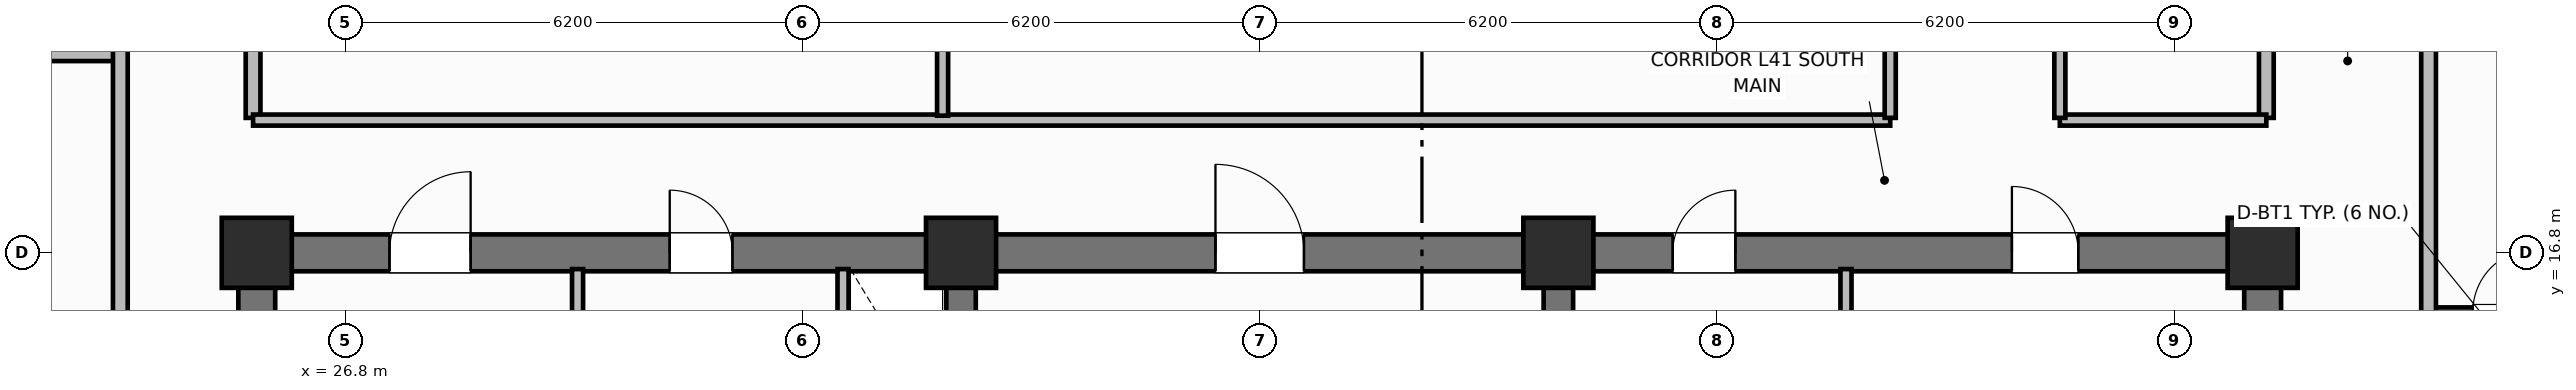
"""IFC4 building model, lengths in metres.
Left out: names, types, materials, properties, quantities, classifications, styles, units other than length and angle.
Written with IfcOpenShell. Run it as: python <this file> out.ifc"""

import sys

from ifc_helpers import new_model, si_unit, direction, frame, frame_2d, origin, origin_2d, place, context, subcontext, project, spatial, rectangle, extrude, element, fill, save


model = new_model("IFC4")
c1 = context("Model", 3, precision=1e-05, world=origin(), true_north=direction((0.0, 1.0)))
c2 = subcontext(c1, "Body", "Model", "MODEL_VIEW")
j1 = project(units=[si_unit("LENGTHUNIT", "METRE"), si_unit("PLANEANGLEUNIT", "RADIAN")], contexts=[c1])
p1 = place(None, origin())
s1 = spatial("IfcSite", under=j1, at=p1, CompositionType="ELEMENT")
p2 = place(p1, origin())
s2 = spatial("IfcBuilding", under=s1, at=p2, CompositionType="ELEMENT")
p3 = place(p2, frame((0.0, 0.0, 166.3)))
s3 = spatial("IfcBuildingStorey", under=s2, at=p3, CompositionType="ELEMENT", Elevation=166.3)
for number, where, z_axis, x_axis in (
    (1, (25.6, 10.85, 0.0), (0.0, 0.0, 1.0), (0.0, 1.0, 0.0)),
    (2, (52.8, 10.85, 0.0), (0.0, 0.0, 1.0), (0.0, 1.0, 0.0)),
):
    element("IfcWall", number, at=place(p3, frame(where, z_axis=z_axis, x_axis=x_axis)), inside=s3, PredefinedType="SHEAR", context=c2, shape_type="SweptSolid", body=[
        extrude(rectangle(XDim=5.7, YDim=0.5, at=frame_2d((2.85, 0.0))), origin(), (0.0, 0.0, 1.0), 3.7),
    ])
p4 = place(p3, frame((25.6, 16.8, 0.0), z_axis=(0.0, 0.0, 1.0), x_axis=(1.0, 0.0, 0.0)))
e3 = element("IfcWall", 3, at=p4, inside=s3, PredefinedType="SHEAR", context=c2, shape_type="SweptSolid", body=[
    extrude(rectangle(XDim=27.2, YDim=0.5, at=frame_2d((13.6, 0.0))), origin(), (0.0, 0.0, 1.0), 3.7),
])
p5 = place(p4, frame((1.8, 0.0, 0.0)))
e4 = element("IfcOpeningElement", 4, at=p5, cuts=e3, PredefinedType="OPENING", context=c2, shape_type="SweptSolid", body=[
    extrude(rectangle(XDim=1.1, YDim=2.15, at=frame_2d((0.55, 1.075))), frame((0.0, 0.26, 0.0), z_axis=(0.0, -1.0, 0.0), x_axis=(1.0, 0.0, 0.0)), (0.0, 0.0, 1.0), 0.52),
])
p6 = place(p4, frame((5.6, 0.0, 0.0)))
e5 = element("IfcOpeningElement", 5, at=p6, cuts=e3, PredefinedType="OPENING", context=c2, shape_type="SweptSolid", body=[
    extrude(rectangle(XDim=0.85, YDim=2.1, at=frame_2d((0.425, 1.05))), frame((0.0, 0.26, 0.0), z_axis=(0.0, -1.0, 0.0), x_axis=(1.0, 0.0, 0.0)), (0.0, 0.0, 1.0), 0.52),
])
p7 = place(p4, frame((13.0, 0.0, 0.0)))
e6 = element("IfcOpeningElement", 6, at=p7, cuts=e3, PredefinedType="OPENING", context=c2, shape_type="SweptSolid", body=[
    extrude(rectangle(XDim=1.2, YDim=2.15, at=frame_2d((0.6, 1.075))), frame((0.0, 0.26, 0.0), z_axis=(0.0, -1.0, 0.0), x_axis=(1.0, 0.0, 0.0)), (0.0, 0.0, 1.0), 0.52),
])
p8 = place(p4, frame((19.2, 0.0, 0.0)))
e7 = element("IfcOpeningElement", 7, at=p8, cuts=e3, PredefinedType="OPENING", context=c2, shape_type="SweptSolid", body=[
    extrude(rectangle(XDim=0.85, YDim=2.1, at=frame_2d((0.425, 1.05))), frame((0.0, 0.26, 0.0), z_axis=(0.0, -1.0, 0.0), x_axis=(1.0, 0.0, 0.0)), (0.0, 0.0, 1.0), 0.52),
])
p9 = place(p4, frame((23.8, 0.0, 0.0)))
e8 = element("IfcOpeningElement", 8, at=p9, cuts=e3, PredefinedType="OPENING", context=c2, shape_type="SweptSolid", body=[
    extrude(rectangle(XDim=0.9, YDim=2.1, at=frame_2d((0.45, 1.05))), frame((0.0, 0.26, 0.0), z_axis=(0.0, -1.0, 0.0), x_axis=(1.0, 0.0, 0.0)), (0.0, 0.0, 1.0), 0.52),
])
for number, where, z_axis, x_axis in (
    (9, (35.15, 10.85, 0.0), (0.0, 0.0, 1.0), (0.0, 1.0, 0.0)),
    (10, (43.25, 10.85, 0.0), (0.0, 0.0, 1.0), (0.0, 1.0, 0.0)),
):
    element("IfcWall", number, at=place(p3, frame(where, z_axis=z_axis, x_axis=x_axis)), inside=s3, PredefinedType="SHEAR", context=c2, shape_type="SweptSolid", body=[
        extrude(rectangle(XDim=5.7, YDim=0.4, at=frame_2d((2.85, 0.0))), origin(), (0.0, 0.0, 1.0), 3.7),
    ])
for number, where, z_axis, x_axis in (
    (11, (25.6, 16.8, 0.0), (0.0, 0.0, 1.0), (1.0, 0.0, 0.0)),
    (12, (35.15, 16.8, 0.0), (0.0, 0.0, 1.0), (1.0, 0.0, 0.0)),
    (13, (43.25, 16.8, 0.0), (0.0, 0.0, 1.0), (1.0, 0.0, 0.0)),
    (14, (52.8, 16.8, 0.0), (0.0, 0.0, 1.0), (1.0, 0.0, 0.0)),
):
    element("IfcColumn", number, at=place(p3, frame(where, z_axis=z_axis, x_axis=x_axis)), inside=s3, PredefinedType="COLUMN", context=c2, shape_type="SweptSolid", body=[
        extrude(rectangle(XDim=0.95, YDim=0.95, at=origin_2d()), origin(), (0.0, 0.0, 1.0), 3.7),
    ])
p10 = place(p3, frame((29.95, 14.5, 0.0), z_axis=(0.0, 0.0, 1.0), x_axis=(0.0, 1.0, 0.0)))
e15 = element("IfcWall", 15, at=p10, inside=s3, PredefinedType="PARTITIONING", context=c2, shape_type="SweptSolid", body=[
    extrude(rectangle(XDim=2.08, YDim=0.15, at=frame_2d((1.04, 0.0))), origin(), (0.0, 0.0, 1.0), 2.55),
])
p11 = place(p3, frame((33.55, 14.5, 0.0), z_axis=(0.0, 0.0, 1.0), x_axis=(0.0, 1.0, 0.0)))
e16 = element("IfcWall", 16, at=p11, inside=s3, PredefinedType="PARTITIONING", context=c2, shape_type="SweptSolid", body=[
    extrude(rectangle(XDim=2.08, YDim=0.15, at=frame_2d((1.04, 0.0))), origin(), (0.0, 0.0, 1.0), 2.55),
])
p12 = place(p11, frame((0.55, 0.0, 0.0)))
e17 = element("IfcOpeningElement", 17, at=p12, cuts=e16, PredefinedType="OPENING", context=c2, shape_type="SweptSolid", body=[
    extrude(rectangle(XDim=0.85, YDim=2.05, at=frame_2d((0.425, 1.025))), frame((0.0, 0.085, 0.0), z_axis=(0.0, -1.0, 0.0), x_axis=(1.0, 0.0, 0.0)), (0.0, 0.0, 1.0), 0.17),
])
p13 = place(p3, frame((47.15, 10.95, 0.0), z_axis=(0.0, 0.0, 1.0), x_axis=(0.0, 1.0, 0.0)))
e18 = element("IfcWall", 18, at=p13, inside=s3, PredefinedType="PARTITIONING", context=c2, shape_type="SweptSolid", body=[
    extrude(rectangle(XDim=5.63, YDim=0.15, at=frame_2d((2.815, 0.0))), origin(), (0.0, 0.0, 1.0), 2.55),
])
for number, where, z_axis, x_axis in (
    (19, (25.55, 18.63, 0.0), (0.0, 0.0, 1.0), (0.0, 1.0, 0.0)),
    (20, (52.85, 18.63, 0.0), (0.0, 0.0, 1.0), (0.0, 1.0, 0.0)),
):
    element("IfcWall", number, at=place(p3, frame(where, z_axis=z_axis, x_axis=x_axis)), inside=s3, PredefinedType="PARTITIONING", context=c2, shape_type="SweptSolid", body=[
        extrude(rectangle(XDim=19.14, YDim=0.2, at=frame_2d((9.57, 0.0))), origin(), (0.0, 0.0, 1.0), 2.55),
    ])
p14 = place(p3, frame((25.55, 18.6, 0.0), z_axis=(0.0, 0.0, 1.0), x_axis=(1.0, 0.0, 0.0)))
e21 = element("IfcWall", 21, at=p14, inside=s3, PredefinedType="PARTITIONING", context=c2, shape_type="SweptSolid", body=[
    extrude(rectangle(XDim=22.2, YDim=0.15, at=frame_2d((11.1, 0.0))), origin(), (0.0, 0.0, 1.0), 2.55),
])
p15 = place(p3, frame((50.05, 18.6, 0.0), z_axis=(0.0, 0.0, 1.0), x_axis=(1.0, 0.0, 0.0)))
e22 = element("IfcWall", 22, at=p15, inside=s3, PredefinedType="PARTITIONING", context=c2, shape_type="SweptSolid", body=[
    extrude(rectangle(XDim=2.8, YDim=0.15, at=frame_2d((1.4, 0.0))), origin(), (0.0, 0.0, 1.0), 2.55),
])
p16 = place(p3, frame((34.9, 18.66, 0.0), z_axis=(0.0, 0.0, 1.0), x_axis=(0.0, 1.0, 0.0)))
e23 = element("IfcWall", 23, at=p16, inside=s3, PredefinedType="PARTITIONING", context=c2, shape_type="SweptSolid", body=[
    extrude(rectangle(XDim=19.08, YDim=0.15, at=frame_2d((9.54, 0.0))), origin(), (0.0, 0.0, 1.0), 2.55),
])
p17 = place(p16, frame((5.0, 0.0, 0.0)))
e24 = element("IfcOpeningElement", 24, at=p17, cuts=e23, PredefinedType="OPENING", context=c2, shape_type="SweptSolid", body=[
    extrude(rectangle(XDim=1.0, YDim=2.15, at=frame_2d((0.5, 1.075))), frame((0.0, 0.085, 0.0), z_axis=(0.0, -1.0, 0.0), x_axis=(1.0, 0.0, 0.0)), (0.0, 0.0, 1.0), 0.17),
])
p18 = place(p3, frame((47.75, 18.63, 0.0), z_axis=(0.0, 0.0, 1.0), x_axis=(0.0, 1.0, 0.0)))
e25 = element("IfcWall", 25, at=p18, inside=s3, PredefinedType="PARTITIONING", context=c2, shape_type="SweptSolid", body=[
    extrude(rectangle(XDim=19.14, YDim=0.15, at=frame_2d((9.57, 0.0))), origin(), (0.0, 0.0, 1.0), 2.55),
])
p19 = place(p18, frame((2.4, 0.0, 0.0)))
e26 = element("IfcOpeningElement", 26, at=p19, cuts=e25, PredefinedType="OPENING", context=c2, shape_type="SweptSolid", body=[
    extrude(rectangle(XDim=0.9, YDim=2.1, at=frame_2d((0.45, 1.05))), frame((0.0, 0.085, 0.0), z_axis=(0.0, -1.0, 0.0), x_axis=(1.0, 0.0, 0.0)), (0.0, 0.0, 1.0), 0.17),
])
p20 = place(p18, frame((10.804, 0.0, 0.0)))
e27 = element("IfcOpeningElement", 27, at=p20, cuts=e25, PredefinedType="OPENING", context=c2, shape_type="SweptSolid", body=[
    extrude(rectangle(XDim=0.9, YDim=2.1, at=frame_2d((0.45, 1.05))), frame((0.0, 0.085, 0.0), z_axis=(0.0, -1.0, 0.0), x_axis=(1.0, 0.0, 0.0)), (0.0, 0.0, 1.0), 0.17),
])
p21 = place(p3, frame((50.05, 18.63, 0.0), z_axis=(0.0, 0.0, 1.0), x_axis=(0.0, 1.0, 0.0)))
e28 = element("IfcWall", 28, at=p21, inside=s3, PredefinedType="PARTITIONING", context=c2, shape_type="SweptSolid", body=[
    extrude(rectangle(XDim=19.14, YDim=0.15, at=frame_2d((9.57, 0.0))), origin(), (0.0, 0.0, 1.0), 2.55),
])
p22 = place(p21, frame((2.4, 0.0, 0.0)))
e29 = element("IfcOpeningElement", 29, at=p22, cuts=e28, PredefinedType="OPENING", context=c2, shape_type="SweptSolid", body=[
    extrude(rectangle(XDim=1.0, YDim=2.15, at=frame_2d((0.5, 1.075))), frame((0.0, 0.085, 0.0), z_axis=(0.0, -1.0, 0.0), x_axis=(1.0, 0.0, 0.0)), (0.0, 0.0, 1.0), 0.17),
])
p23 = place(p21, frame((10.804, 0.0, 0.0)))
e30 = element("IfcOpeningElement", 30, at=p23, cuts=e28, PredefinedType="OPENING", context=c2, shape_type="SweptSolid", body=[
    extrude(rectangle(XDim=1.0, YDim=2.15, at=frame_2d((0.5, 1.075))), frame((0.0, 0.085, 0.0), z_axis=(0.0, -1.0, 0.0), x_axis=(1.0, 0.0, 0.0)), (0.0, 0.0, 1.0), 0.17),
])
p24 = place(p3, frame((16.57, 19.5, 0.0), z_axis=(0.0, 0.0, 1.0), x_axis=(1.0, 0.0, 0.0)))
e31 = element("IfcWall", 31, at=p24, inside=s3, PredefinedType="PARTITIONING", context=c2, shape_type="SweptSolid", body=[
    extrude(rectangle(XDim=7.18, YDim=0.2, at=frame_2d((3.59, 0.0))), origin(), (0.0, 0.0, 1.0), 2.55),
])
p25 = place(p3, frame((23.75, 10.6, 0.0), z_axis=(0.0, 0.0, 1.0), x_axis=(0.0, 1.0, 0.0)))
e32 = element("IfcWall", 32, at=p25, inside=s3, PredefinedType="PARTITIONING", context=c2, shape_type="SweptSolid", body=[
    extrude(rectangle(XDim=35.2, YDim=0.2, at=frame_2d((17.6, 0.0))), origin(), (0.0, 0.0, 1.0), 2.55),
])
p26 = place(p25, frame((2.65, 0.0, 0.0)))
e33 = element("IfcOpeningElement", 33, at=p26, cuts=e32, PredefinedType="OPENING", context=c2, shape_type="SweptSolid", body=[
    extrude(rectangle(XDim=1.0, YDim=2.15, at=frame_2d((0.5, 1.075))), frame((0.0, 0.11, 0.0), z_axis=(0.0, -1.0, 0.0), x_axis=(1.0, 0.0, 0.0)), (0.0, 0.0, 1.0), 0.22),
])
p27 = place(p25, frame((11.4, 0.0, 0.0)))
e34 = element("IfcOpeningElement", 34, at=p27, cuts=e32, PredefinedType="OPENING", context=c2, shape_type="SweptSolid", body=[
    extrude(rectangle(XDim=1.0, YDim=2.15, at=frame_2d((0.5, 1.075))), frame((0.0, 0.11, 0.0), z_axis=(0.0, -1.0, 0.0), x_axis=(1.0, 0.0, 0.0)), (0.0, 0.0, 1.0), 0.22),
])
p28 = place(p25, frame((21.37, 0.0, 0.0)))
e35 = element("IfcOpeningElement", 35, at=p28, cuts=e32, PredefinedType="OPENING", context=c2, shape_type="SweptSolid", body=[
    extrude(rectangle(XDim=1.0, YDim=2.15, at=frame_2d((0.5, 1.075))), frame((0.0, 0.11, 0.0), z_axis=(0.0, -1.0, 0.0), x_axis=(1.0, 0.0, 0.0)), (0.0, 0.0, 1.0), 0.22),
])
p29 = place(p25, frame((27.302, 0.0, 0.0)))
e36 = element("IfcOpeningElement", 36, at=p29, cuts=e32, PredefinedType="OPENING", context=c2, shape_type="SweptSolid", body=[
    extrude(rectangle(XDim=1.0, YDim=2.15, at=frame_2d((0.5, 1.075))), frame((0.0, 0.11, 0.0), z_axis=(0.0, -1.0, 0.0), x_axis=(1.0, 0.0, 0.0)), (0.0, 0.0, 1.0), 0.22),
])
p30 = place(p3, frame((55.05, 16.0, 0.0), z_axis=(0.0, 0.0, 1.0), x_axis=(1.0, 0.0, 0.0)))
e37 = element("IfcWall", 37, at=p30, inside=s3, PredefinedType="PARTITIONING", context=c2, shape_type="SweptSolid", body=[
    extrude(rectangle(XDim=2.25, YDim=0.12, at=frame_2d((1.125, 0.0))), origin(), (0.0, 0.0, 1.0), 2.55),
])
p31 = place(p30, frame((0.6, 0.0, 0.0)))
e38 = element("IfcOpeningElement", 38, at=p31, cuts=e37, PredefinedType="OPENING", context=c2, shape_type="SweptSolid", body=[
    extrude(rectangle(XDim=0.85, YDim=2.1, at=frame_2d((0.425, 1.05))), frame((0.0, 0.07, 0.0), z_axis=(0.0, -1.0, 0.0), x_axis=(1.0, 0.0, 0.0)), (0.0, 0.0, 1.0), 0.14),
])
p32 = place(p3, frame((55.05, 10.6, 0.0), z_axis=(0.0, 0.0, 1.0), x_axis=(0.0, 1.0, 0.0)))
e39 = element("IfcWall", 39, at=p32, inside=s3, PredefinedType="PARTITIONING", context=c2, shape_type="SweptSolid", body=[
    extrude(rectangle(XDim=35.2, YDim=0.2, at=frame_2d((17.6, 0.0))), origin(), (0.0, 0.0, 1.0), 2.55),
])
p33 = place(p32, frame((2.65, 0.0, 0.0)))
e40 = element("IfcOpeningElement", 40, at=p33, cuts=e39, PredefinedType="OPENING", context=c2, shape_type="SweptSolid", body=[
    extrude(rectangle(XDim=1.0, YDim=2.15, at=frame_2d((0.5, 1.075))), frame((0.0, 0.11, 0.0), z_axis=(0.0, -1.0, 0.0), x_axis=(1.0, 0.0, 0.0)), (0.0, 0.0, 1.0), 0.22),
])
p34 = place(p32, frame((19.95, 0.0, 0.0)))
e41 = element("IfcOpeningElement", 41, at=p34, cuts=e39, PredefinedType="OPENING", context=c2, shape_type="SweptSolid", body=[
    extrude(rectangle(XDim=1.0, YDim=2.15, at=frame_2d((0.5, 1.075))), frame((0.0, 0.11, 0.0), z_axis=(0.0, -1.0, 0.0), x_axis=(1.0, 0.0, 0.0)), (0.0, 0.0, 1.0), 0.22),
])
p35 = place(p31, origin())
e42 = element("IfcDoor", 42, at=p35, inside=s3, OperationType="SINGLE_SWING_RIGHT", PredefinedType="DOOR", context=c2, shape_type="SweptSolid", body=[
    extrude(rectangle(XDim=0.85, YDim=2.1, at=frame_2d((0.425, 1.05))), frame((0.0, 0.025, 0.0), z_axis=(0.0, -1.0, 0.0), x_axis=(1.0, 0.0, 0.0)), (0.0, 0.0, 1.0), 0.05),
])
fill(e38, e42)
p36 = place(p5, origin())
e43 = element("IfcDoor", 43, at=p36, inside=s3, OperationType="SINGLE_SWING_RIGHT", PredefinedType="DOOR", context=c2, shape_type="SweptSolid", body=[
    extrude(rectangle(XDim=1.1, YDim=2.15, at=frame_2d((0.55, 1.075))), frame((0.0, 0.025, 0.0), z_axis=(0.0, -1.0, 0.0), x_axis=(1.0, 0.0, 0.0)), (0.0, 0.0, 1.0), 0.05),
])
fill(e4, e43)
p37 = place(p6, origin())
e44 = element("IfcDoor", 44, at=p37, inside=s3, OperationType="SINGLE_SWING_LEFT", PredefinedType="DOOR", context=c2, shape_type="SweptSolid", body=[
    extrude(rectangle(XDim=0.85, YDim=2.1, at=frame_2d((0.425, 1.05))), frame((0.0, 0.025, 0.0), z_axis=(0.0, -1.0, 0.0), x_axis=(1.0, 0.0, 0.0)), (0.0, 0.0, 1.0), 0.05),
])
fill(e5, e44)
p38 = place(p7, origin())
e45 = element("IfcDoor", 45, at=p38, inside=s3, OperationType="SINGLE_SWING_LEFT", PredefinedType="DOOR", context=c2, shape_type="SweptSolid", body=[
    extrude(rectangle(XDim=1.2, YDim=2.15, at=frame_2d((0.6, 1.075))), frame((0.0, 0.025, 0.0), z_axis=(0.0, -1.0, 0.0), x_axis=(1.0, 0.0, 0.0)), (0.0, 0.0, 1.0), 0.05),
])
fill(e6, e45)
p39 = place(p8, origin())
e46 = element("IfcDoor", 46, at=p39, inside=s3, OperationType="SINGLE_SWING_RIGHT", PredefinedType="DOOR", context=c2, shape_type="SweptSolid", body=[
    extrude(rectangle(XDim=0.85, YDim=2.1, at=frame_2d((0.425, 1.05))), frame((0.0, 0.025, 0.0), z_axis=(0.0, -1.0, 0.0), x_axis=(1.0, 0.0, 0.0)), (0.0, 0.0, 1.0), 0.05),
])
fill(e7, e46)
p40 = place(p9, origin())
e47 = element("IfcDoor", 47, at=p40, inside=s3, OperationType="SINGLE_SWING_LEFT", PredefinedType="DOOR", context=c2, shape_type="SweptSolid", body=[
    extrude(rectangle(XDim=0.9, YDim=2.1, at=frame_2d((0.45, 1.05))), frame((0.0, 0.025, 0.0), z_axis=(0.0, -1.0, 0.0), x_axis=(1.0, 0.0, 0.0)), (0.0, 0.0, 1.0), 0.05),
])
fill(e8, e47)
save(model, sys.argv[1])
